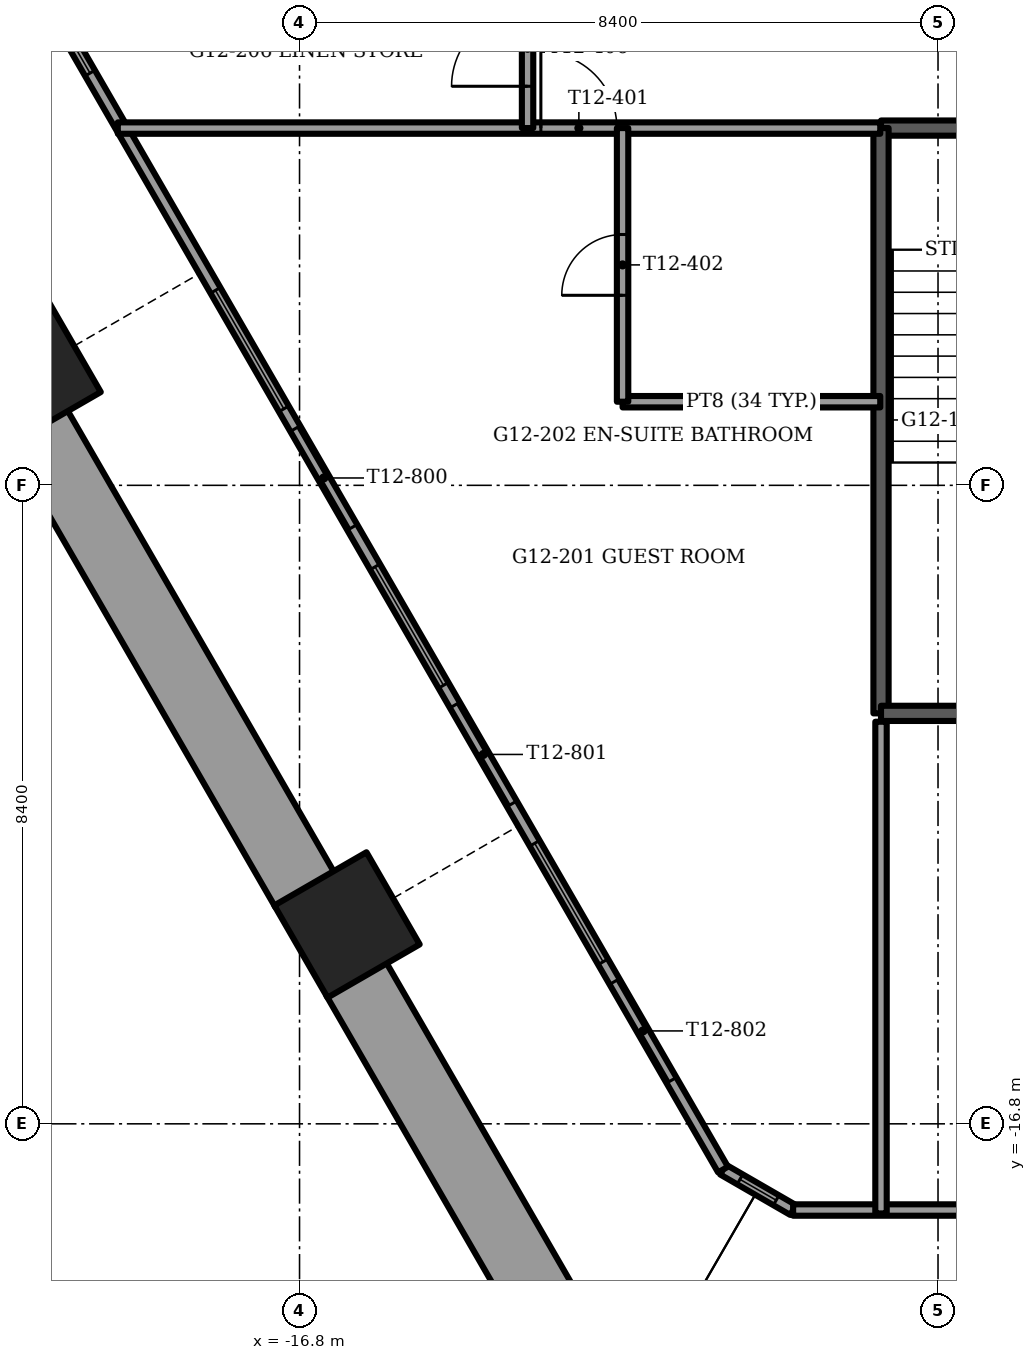
"""IFC4 building model, lengths in metres.
Left out: names, types, materials, properties, quantities, classifications, styles, units other than length and angle.
Written with IfcOpenShell. Run it as: python <this file> out.ifc"""

import sys

from ifc_helpers import new_model, si_unit, direction, frame, frame_2d, origin, origin_2d, place, context, subcontext, project, spatial, rectangle, extrude, element, fill, save


model = new_model("IFC4")
c1 = context("Model", 3, precision=1e-05, world=origin(), true_north=direction((0.0, 1.0)))
c2 = subcontext(c1, "Body", "Model", "MODEL_VIEW")
j1 = project(units=[si_unit("LENGTHUNIT", "METRE"), si_unit("PLANEANGLEUNIT", "RADIAN")], contexts=[c1])
p1 = place(None, origin())
s1 = spatial("IfcSite", under=j1, at=p1, CompositionType="ELEMENT")
p2 = place(p1, origin())
s2 = spatial("IfcBuilding", under=s1, at=p2, CompositionType="ELEMENT")
p3 = place(p2, frame((0.0, 0.0, 50.5)))
s3 = spatial("IfcBuildingStorey", under=s2, at=p3, CompositionType="ELEMENT", Elevation=50.5)
for number, where, z_axis, x_axis in (
    (1, (-20.371, -6.917, -1.2), (0.0, 0.0, 1.0), (-0.5, 0.866, 0.0)),
    (2, (-16.175, -14.183, -1.2), (0.0, 0.0, 1.0), (-0.5, 0.866, 0.0)),
):
    element("IfcColumn", number, at=place(p3, frame(where, z_axis=z_axis, x_axis=x_axis)), inside=s3, PredefinedType="COLUMN", context=c2, shape_type="SweptSolid", body=[
        extrude(rectangle(XDim=1.4, YDim=1.4, at=origin_2d()), origin(), (0.0, 0.0, 1.0), 3.75),
    ])
p4 = place(p3, frame((-20.252, -7.622, 0.0), z_axis=(0.0, 0.0, 1.0), x_axis=(0.499997206141, -0.866027016814, 0.0)))
e3 = element("IfcWall", 3, at=p4, inside=s3, PredefinedType="PARAPET", context=c2, shape_type="SweptSolid", body=[
    extrude(rectangle(XDim=7.051, YDim=0.9, at=frame_2d((3.525, 0.0))), origin(), (0.0, 0.0, 1.0), 1.1),
])
p5 = place(p3, frame((-16.057, -14.889, 0.0), z_axis=(0.0, 0.0, 1.0), x_axis=(0.500007141444, -0.86602128063, 0.0)))
e4 = element("IfcWall", 4, at=p5, inside=s3, PredefinedType="PARAPET", context=c2, shape_type="SweptSolid", body=[
    extrude(rectangle(XDim=6.137, YDim=0.9, at=frame_2d((3.068, 0.0))), origin(), (0.0, 0.0, 1.0), 1.1),
])
p6 = place(p3, frame((-20.685, -1.023, 0.0), z_axis=(0.0, 0.0, 1.0), x_axis=(0.500004426522, -0.866022848116, 0.0)))
e5 = element("IfcWall", 5, at=p6, inside=s3, PredefinedType="SOLIDWALL", context=c2, shape_type="SweptSolid", body=[
    extrude(rectangle(XDim=18.912, YDim=0.15, at=frame_2d((9.456, 0.0))), origin(), (0.0, 0.0, 1.0), 3.45),
])
p7 = place(p6, frame((1.356, 0.0, 0.15)))
e6 = element("IfcOpeningElement", 6, at=p7, cuts=e5, PredefinedType="OPENING", context=c2, shape_type="SweptSolid", body=[
    extrude(rectangle(XDim=0.9, YDim=2.85, at=frame_2d((0.45, 1.425))), frame((0.0, 0.075, 0.0), z_axis=(0.0, -1.0, 0.0), x_axis=(1.0, 0.0, 0.0)), (0.0, 0.0, 1.0), 0.15),
])
p8 = place(p6, frame((5.556, 0.0, 0.15)))
e7 = element("IfcOpeningElement", 7, at=p8, cuts=e5, PredefinedType="OPENING", context=c2, shape_type="SweptSolid", body=[
    extrude(rectangle(XDim=1.8, YDim=2.85, at=frame_2d((0.9, 1.425))), frame((0.0, 0.075, 0.0), z_axis=(0.0, -1.0, 0.0), x_axis=(1.0, 0.0, 0.0)), (0.0, 0.0, 1.0), 0.15),
])
p9 = place(p6, frame((7.656, 0.0, 0.0)))
e8 = element("IfcOpeningElement", 8, at=p9, cuts=e5, PredefinedType="OPENING", context=c2, shape_type="SweptSolid", body=[
    extrude(rectangle(XDim=1.5, YDim=2.4, at=frame_2d((0.75, 1.2))), frame((0.0, 0.075, 0.0), z_axis=(0.0, -1.0, 0.0), x_axis=(1.0, 0.0, 0.0)), (0.0, 0.0, 1.0), 0.15),
])
p10 = place(p6, frame((9.756, 0.0, 0.15)))
e9 = element("IfcOpeningElement", 9, at=p10, cuts=e5, PredefinedType="OPENING", context=c2, shape_type="SweptSolid", body=[
    extrude(rectangle(XDim=1.8, YDim=2.85, at=frame_2d((0.9, 1.425))), frame((0.0, 0.075, 0.0), z_axis=(0.0, -1.0, 0.0), x_axis=(1.0, 0.0, 0.0)), (0.0, 0.0, 1.0), 0.15),
])
p11 = place(p6, frame((11.856, 0.0, 0.0)))
e10 = element("IfcOpeningElement", 10, at=p11, cuts=e5, PredefinedType="OPENING", context=c2, shape_type="SweptSolid", body=[
    extrude(rectangle(XDim=1.5, YDim=2.4, at=frame_2d((0.75, 1.2))), frame((0.0, 0.075, 0.0), z_axis=(0.0, -1.0, 0.0), x_axis=(1.0, 0.0, 0.0)), (0.0, 0.0, 1.0), 0.15),
])
p12 = place(p6, frame((13.956, 0.0, 0.15)))
e11 = element("IfcOpeningElement", 11, at=p12, cuts=e5, PredefinedType="OPENING", context=c2, shape_type="SweptSolid", body=[
    extrude(rectangle(XDim=1.8, YDim=2.85, at=frame_2d((0.9, 1.425))), frame((0.0, 0.075, 0.0), z_axis=(0.0, -1.0, 0.0), x_axis=(1.0, 0.0, 0.0)), (0.0, 0.0, 1.0), 0.15),
])
p13 = place(p6, frame((16.056, 0.0, 0.0)))
e12 = element("IfcOpeningElement", 12, at=p13, cuts=e5, PredefinedType="OPENING", context=c2, shape_type="SweptSolid", body=[
    extrude(rectangle(XDim=1.5, YDim=2.4, at=frame_2d((0.75, 1.2))), frame((0.0, 0.075, 0.0), z_axis=(0.0, -1.0, 0.0), x_axis=(1.0, 0.0, 0.0)), (0.0, 0.0, 1.0), 0.15),
])
p14 = place(p3, frame((-10.306, -17.934, 0.0), z_axis=(0.0, 0.0, 1.0), x_axis=(1.0, 0.0, 0.0)))
e13 = element("IfcWall", 13, at=p14, inside=s3, PredefinedType="SOLIDWALL", context=c2, shape_type="SweptSolid", body=[
    extrude(rectangle(XDim=20.613, YDim=0.15, at=frame_2d((10.306, 0.0))), origin(), (0.0, 0.0, 1.0), 3.45),
])
p15 = place(p14, frame((4.856, 0.0, 0.15)))
e14 = element("IfcOpeningElement", 14, at=p15, cuts=e13, PredefinedType="OPENING", context=c2, shape_type="SweptSolid", body=[
    extrude(rectangle(XDim=0.9, YDim=2.85, at=frame_2d((0.45, 1.425))), frame((0.0, 0.075, 0.0), z_axis=(0.0, -1.0, 0.0), x_axis=(1.0, 0.0, 0.0)), (0.0, 0.0, 1.0), 0.15),
])
p16 = place(p14, frame((2.656, 0.0, 0.15)))
e15 = element("IfcOpeningElement", 15, at=p16, cuts=e13, PredefinedType="OPENING", context=c2, shape_type="SweptSolid", body=[
    extrude(rectangle(XDim=1.5, YDim=2.85, at=frame_2d((0.75, 1.425))), frame((0.0, 0.075, 0.0), z_axis=(0.0, -1.0, 0.0), x_axis=(1.0, 0.0, 0.0)), (0.0, 0.0, 1.0), 0.15),
])
p17 = place(p14, frame((6.406, 0.0, 0.15)))
e16 = element("IfcOpeningElement", 16, at=p17, cuts=e13, PredefinedType="OPENING", context=c2, shape_type="SweptSolid", body=[
    extrude(rectangle(XDim=1.8, YDim=2.85, at=frame_2d((0.9, 1.425))), frame((0.0, 0.075, 0.0), z_axis=(0.0, -1.0, 0.0), x_axis=(1.0, 0.0, 0.0)), (0.0, 0.0, 1.0), 0.15),
])
p18 = place(p14, frame((8.456, 0.0, 0.15)))
e17 = element("IfcOpeningElement", 17, at=p18, cuts=e13, PredefinedType="OPENING", context=c2, shape_type="SweptSolid", body=[
    extrude(rectangle(XDim=1.5, YDim=2.85, at=frame_2d((0.75, 1.425))), frame((0.0, 0.075, 0.0), z_axis=(0.0, -1.0, 0.0), x_axis=(1.0, 0.0, 0.0)), (0.0, 0.0, 1.0), 0.15),
])
p19 = place(p14, frame((10.656, 0.0, 0.15)))
e18 = element("IfcOpeningElement", 18, at=p19, cuts=e13, PredefinedType="OPENING", context=c2, shape_type="SweptSolid", body=[
    extrude(rectangle(XDim=1.8, YDim=2.85, at=frame_2d((0.9, 1.425))), frame((0.0, 0.075, 0.0), z_axis=(0.0, -1.0, 0.0), x_axis=(1.0, 0.0, 0.0)), (0.0, 0.0, 1.0), 0.15),
])
p20 = place(p14, frame((12.706, 0.0, 0.0)))
e19 = element("IfcOpeningElement", 19, at=p20, cuts=e13, PredefinedType="OPENING", context=c2, shape_type="SweptSolid", body=[
    extrude(rectangle(XDim=1.5, YDim=2.4, at=frame_2d((0.75, 1.2))), frame((0.0, 0.075, 0.0), z_axis=(0.0, -1.0, 0.0), x_axis=(1.0, 0.0, 0.0)), (0.0, 0.0, 1.0), 0.15),
])
p21 = place(p14, frame((16.456, 0.0, 0.15)))
e20 = element("IfcOpeningElement", 20, at=p21, cuts=e13, PredefinedType="OPENING", context=c2, shape_type="SweptSolid", body=[
    extrude(rectangle(XDim=1.8, YDim=2.85, at=frame_2d((0.9, 1.425))), frame((0.0, 0.075, 0.0), z_axis=(0.0, -1.0, 0.0), x_axis=(1.0, 0.0, 0.0)), (0.0, 0.0, 1.0), 0.15),
])
p22 = place(p3, frame((-11.229, -17.402, 0.0), z_axis=(0.0, 0.0, 1.0), x_axis=(0.865990848561, -0.500059846627, 0.0)))
e21 = element("IfcWall", 21, at=p22, inside=s3, PredefinedType="SOLIDWALL", context=c2, shape_type="SweptSolid", body=[
    extrude(rectangle(XDim=1.065, YDim=0.15, at=frame_2d((0.532, 0.0))), origin(), (0.0, 0.0, 1.0), 3.45),
])
p23 = place(p22, frame((0.258, 0.0, 0.15)))
e22 = element("IfcOpeningElement", 22, at=p23, cuts=e21, PredefinedType="OPENING", context=c2, shape_type="SweptSolid", body=[
    extrude(rectangle(XDim=0.55, YDim=2.85, at=frame_2d((0.275, 1.425))), frame((0.0, 0.075, 0.0), z_axis=(0.0, -1.0, 0.0), x_axis=(1.0, 0.0, 0.0)), (0.0, 0.0, 1.0), 0.15),
])
p24 = place(p3, frame((-9.15, -3.7, -0.3), z_axis=(0.0, 0.0, 1.0), x_axis=(1.0, 0.0, 0.0)))
e23 = element("IfcWall", 23, at=p24, inside=s3, PredefinedType="SOLIDWALL", context=c2, shape_type="SweptSolid", body=[
    extrude(rectangle(XDim=3.35, YDim=0.2, at=frame_2d((1.675, 0.0))), origin(), (0.0, 0.0, 1.0), 3.75),
])
p25 = place(p24, frame((1.125, 0.0, 0.0)))
e24 = element("IfcOpeningElement", 24, at=p25, cuts=e23, PredefinedType="OPENING", context=c2, shape_type="SweptSolid", body=[
    extrude(rectangle(XDim=1.1, YDim=2.1, at=frame_2d((0.55, 1.05))), frame((0.0, 0.1, 0.0), z_axis=(0.0, -1.0, 0.0), x_axis=(1.0, 0.0, 0.0)), (0.0, 0.0, 1.0), 0.2),
])
p26 = place(p3, frame((-9.15, -3.7, -0.3), z_axis=(0.0, 0.0, 1.0), x_axis=(0.0, -1.0, 0.0)))
e25 = element("IfcWall", 25, at=p26, inside=s3, PredefinedType="SOLIDWALL", context=c2, shape_type="SweptSolid", body=[
    extrude(rectangle(XDim=7.7, YDim=0.2, at=frame_2d((3.85, 0.0))), origin(), (0.0, 0.0, 1.0), 3.75),
])
p27 = place(p3, frame((-9.15, -11.4, -0.3), z_axis=(0.0, 0.0, 1.0), x_axis=(1.0, 0.0, 0.0)))
e26 = element("IfcWall", 26, at=p27, inside=s3, PredefinedType="SOLIDWALL", context=c2, shape_type="SweptSolid", body=[
    extrude(rectangle(XDim=3.35, YDim=0.2, at=frame_2d((1.675, 0.0))), origin(), (0.0, 0.0, 1.0), 3.75),
])
p28 = place(p3, frame((-12.55, -7.3, 0.0), z_axis=(0.0, 0.0, 1.0), x_axis=(1.0, 0.0, 0.0)))
e27 = element("IfcWall", 27, at=p28, inside=s3, PredefinedType="PARTITIONING", context=c2, shape_type="SweptSolid", body=[
    extrude(rectangle(XDim=3.39, YDim=0.15, at=frame_2d((1.695, 0.0))), origin(), (0.0, 0.0, 1.0), 3.45),
])
p29 = place(p3, frame((-19.191, -3.7, 0.0), z_axis=(0.0, 0.0, 1.0), x_axis=(1.0, 0.0, 0.0)))
e28 = element("IfcWall", 28, at=p29, inside=s3, PredefinedType="PARTITIONING", context=c2, shape_type="SweptSolid", body=[
    extrude(rectangle(XDim=10.031, YDim=0.15, at=frame_2d((5.016, 0.0))), origin(), (0.0, 0.0, 1.0), 3.45),
])
p30 = place(p29, frame((5.566, 0.0, 0.0)))
e29 = element("IfcOpeningElement", 29, at=p30, cuts=e28, PredefinedType="OPENING", context=c2, shape_type="SweptSolid", body=[
    extrude(rectangle(XDim=1.0, YDim=2.1, at=frame_2d((0.5, 1.05))), frame((0.0, 0.075, 0.0), z_axis=(0.0, -1.0, 0.0), x_axis=(1.0, 0.0, 0.0)), (0.0, 0.0, 1.0), 0.15),
])
p31 = place(p3, frame((-9.15, -17.979, 0.0), z_axis=(0.0, 0.0, 1.0), x_axis=(0.0, 1.0, 0.0)))
e30 = element("IfcWall", 30, at=p31, inside=s3, PredefinedType="PARTITIONING", context=c2, shape_type="SweptSolid", body=[
    extrude(rectangle(XDim=6.469, YDim=0.15, at=frame_2d((3.234, 0.0))), origin(), (0.0, 0.0, 1.0), 3.45),
])
p32 = place(p3, frame((-12.55, -7.3, 0.0), z_axis=(0.0, 0.0, 1.0), x_axis=(0.0, 1.0, 0.0)))
e31 = element("IfcWall", 31, at=p32, inside=s3, PredefinedType="PARTITIONING", context=c2, shape_type="SweptSolid", body=[
    extrude(rectangle(XDim=3.6, YDim=0.15, at=frame_2d((1.8, 0.0))), origin(), (0.0, 0.0, 1.0), 3.45),
])
p33 = place(p32, frame((1.4, 0.0, 0.0)))
e32 = element("IfcOpeningElement", 32, at=p33, cuts=e31, PredefinedType="OPENING", context=c2, shape_type="SweptSolid", body=[
    extrude(rectangle(XDim=0.8, YDim=2.1, at=frame_2d((0.4, 1.05))), frame((0.0, 0.075, 0.0), z_axis=(0.0, -1.0, 0.0), x_axis=(1.0, 0.0, 0.0)), (0.0, 0.0, 1.0), 0.15),
])
p34 = place(p3, frame((-13.8, -3.7, 0.0), z_axis=(0.0, 0.0, 1.0), x_axis=(0.0, 1.0, 0.0)))
e33 = element("IfcWall", 33, at=p34, inside=s3, PredefinedType="PARTITIONING", context=c2, shape_type="SweptSolid", body=[
    extrude(rectangle(XDim=15.756, YDim=0.15, at=frame_2d((7.878, 0.0))), origin(), (0.0, 0.0, 1.0), 3.45),
])
p35 = place(p34, frame((0.55, 0.0, 0.0)))
e34 = element("IfcOpeningElement", 34, at=p35, cuts=e33, PredefinedType="OPENING", context=c2, shape_type="SweptSolid", body=[
    extrude(rectangle(XDim=1.0, YDim=2.1, at=frame_2d((0.5, 1.05))), frame((0.0, 0.075, 0.0), z_axis=(0.0, -1.0, 0.0), x_axis=(1.0, 0.0, 0.0)), (0.0, 0.0, 1.0), 0.15),
])
p36 = place(p34, frame((2.35, 0.0, 0.0)))
e35 = element("IfcOpeningElement", 35, at=p36, cuts=e33, PredefinedType="OPENING", context=c2, shape_type="SweptSolid", body=[
    extrude(rectangle(XDim=1.0, YDim=2.1, at=frame_2d((0.5, 1.05))), frame((0.0, 0.075, 0.0), z_axis=(0.0, -1.0, 0.0), x_axis=(1.0, 0.0, 0.0)), (0.0, 0.0, 1.0), 0.15),
])
p37 = place(p34, frame((10.407, 0.0, 0.0)))
e36 = element("IfcOpeningElement", 36, at=p37, cuts=e33, PredefinedType="OPENING", context=c2, shape_type="SweptSolid", body=[
    extrude(rectangle(XDim=1.0, YDim=2.1, at=frame_2d((0.5, 1.05))), frame((0.0, 0.075, 0.0), z_axis=(0.0, -1.0, 0.0), x_axis=(1.0, 0.0, 0.0)), (0.0, 0.0, 1.0), 0.15),
])
p38 = place(p7, origin())
e37 = element("IfcWindow", 37, at=p38, inside=s3, PartitioningType="SINGLE_PANEL", PredefinedType="WINDOW", context=c2, shape_type="SweptSolid", body=[
    extrude(rectangle(XDim=0.9, YDim=2.85, at=frame_2d((0.45, 1.425))), frame((0.0, 0.03, 0.0), z_axis=(0.0, -1.0, 0.0), x_axis=(1.0, 0.0, 0.0)), (0.0, 0.0, 1.0), 0.06),
])
fill(e6, e37)
p39 = place(p8, origin())
e38 = element("IfcWindow", 38, at=p39, inside=s3, PartitioningType="SINGLE_PANEL", PredefinedType="WINDOW", context=c2, shape_type="SweptSolid", body=[
    extrude(rectangle(XDim=1.8, YDim=2.85, at=frame_2d((0.9, 1.425))), frame((0.0, 0.03, 0.0), z_axis=(0.0, -1.0, 0.0), x_axis=(1.0, 0.0, 0.0)), (0.0, 0.0, 1.0), 0.06),
])
fill(e7, e38)
p40 = place(p9, origin())
e39 = element("IfcDoor", 39, at=p40, inside=s3, OperationType="SLIDING_TO_RIGHT", PredefinedType="DOOR", context=c2, shape_type="SweptSolid", body=[
    extrude(rectangle(XDim=1.5, YDim=2.4, at=frame_2d((0.75, 1.2))), frame((0.0, 0.025, 0.0), z_axis=(0.0, -1.0, 0.0), x_axis=(1.0, 0.0, 0.0)), (0.0, 0.0, 1.0), 0.05),
])
fill(e8, e39)
p41 = place(p10, origin())
e40 = element("IfcWindow", 40, at=p41, inside=s3, PartitioningType="SINGLE_PANEL", PredefinedType="WINDOW", context=c2, shape_type="SweptSolid", body=[
    extrude(rectangle(XDim=1.8, YDim=2.85, at=frame_2d((0.9, 1.425))), frame((0.0, 0.03, 0.0), z_axis=(0.0, -1.0, 0.0), x_axis=(1.0, 0.0, 0.0)), (0.0, 0.0, 1.0), 0.06),
])
fill(e9, e40)
p42 = place(p11, origin())
e41 = element("IfcDoor", 41, at=p42, inside=s3, OperationType="SLIDING_TO_LEFT", PredefinedType="DOOR", context=c2, shape_type="SweptSolid", body=[
    extrude(rectangle(XDim=1.5, YDim=2.4, at=frame_2d((0.75, 1.2))), frame((0.0, 0.025, 0.0), z_axis=(0.0, -1.0, 0.0), x_axis=(1.0, 0.0, 0.0)), (0.0, 0.0, 1.0), 0.05),
])
fill(e10, e41)
p43 = place(p12, origin())
e42 = element("IfcWindow", 42, at=p43, inside=s3, PartitioningType="SINGLE_PANEL", PredefinedType="WINDOW", context=c2, shape_type="SweptSolid", body=[
    extrude(rectangle(XDim=1.8, YDim=2.85, at=frame_2d((0.9, 1.425))), frame((0.0, 0.03, 0.0), z_axis=(0.0, -1.0, 0.0), x_axis=(1.0, 0.0, 0.0)), (0.0, 0.0, 1.0), 0.06),
])
fill(e11, e42)
p44 = place(p13, origin())
e43 = element("IfcDoor", 43, at=p44, inside=s3, OperationType="SLIDING_TO_RIGHT", PredefinedType="DOOR", context=c2, shape_type="SweptSolid", body=[
    extrude(rectangle(XDim=1.5, YDim=2.4, at=frame_2d((0.75, 1.2))), frame((0.0, 0.025, 0.0), z_axis=(0.0, -1.0, 0.0), x_axis=(1.0, 0.0, 0.0)), (0.0, 0.0, 1.0), 0.05),
])
fill(e12, e43)
p45 = place(p23, origin())
e44 = element("IfcWindow", 44, at=p45, inside=s3, PartitioningType="SINGLE_PANEL", PredefinedType="WINDOW", context=c2, shape_type="SweptSolid", body=[
    extrude(rectangle(XDim=0.55, YDim=2.85, at=frame_2d((0.275, 1.425))), frame((0.0, 0.03, 0.0), z_axis=(0.0, -1.0, 0.0), x_axis=(1.0, 0.0, 0.0)), (0.0, 0.0, 1.0), 0.06),
])
fill(e22, e44)
p46 = place(p30, origin())
e45 = element("IfcDoor", 45, at=p46, inside=s3, OperationType="SINGLE_SWING_LEFT", PredefinedType="DOOR", context=c2, shape_type="SweptSolid", body=[
    extrude(rectangle(XDim=1.0, YDim=2.1, at=frame_2d((0.5, 1.05))), frame((0.0, 0.025, 0.0), z_axis=(0.0, -1.0, 0.0), x_axis=(1.0, 0.0, 0.0)), (0.0, 0.0, 1.0), 0.05),
])
fill(e29, e45)
p47 = place(p33, origin())
e46 = element("IfcDoor", 46, at=p47, inside=s3, OperationType="SINGLE_SWING_RIGHT", PredefinedType="DOOR", context=c2, shape_type="SweptSolid", body=[
    extrude(rectangle(XDim=0.8, YDim=2.1, at=frame_2d((0.4, 1.05))), frame((0.0, 0.025, 0.0), z_axis=(0.0, -1.0, 0.0), x_axis=(1.0, 0.0, 0.0)), (0.0, 0.0, 1.0), 0.05),
])
fill(e32, e46)
p48 = place(p35, origin())
e47 = element("IfcDoor", 47, at=p48, inside=s3, OperationType="SINGLE_SWING_LEFT", PredefinedType="DOOR", context=c2, shape_type="SweptSolid", body=[
    extrude(rectangle(XDim=1.0, YDim=2.1, at=frame_2d((0.5, 1.05))), frame((0.0, 0.025, 0.0), z_axis=(0.0, -1.0, 0.0), x_axis=(1.0, 0.0, 0.0)), (0.0, 0.0, 1.0), 0.05),
])
fill(e34, e47)
save(model, sys.argv[1])
